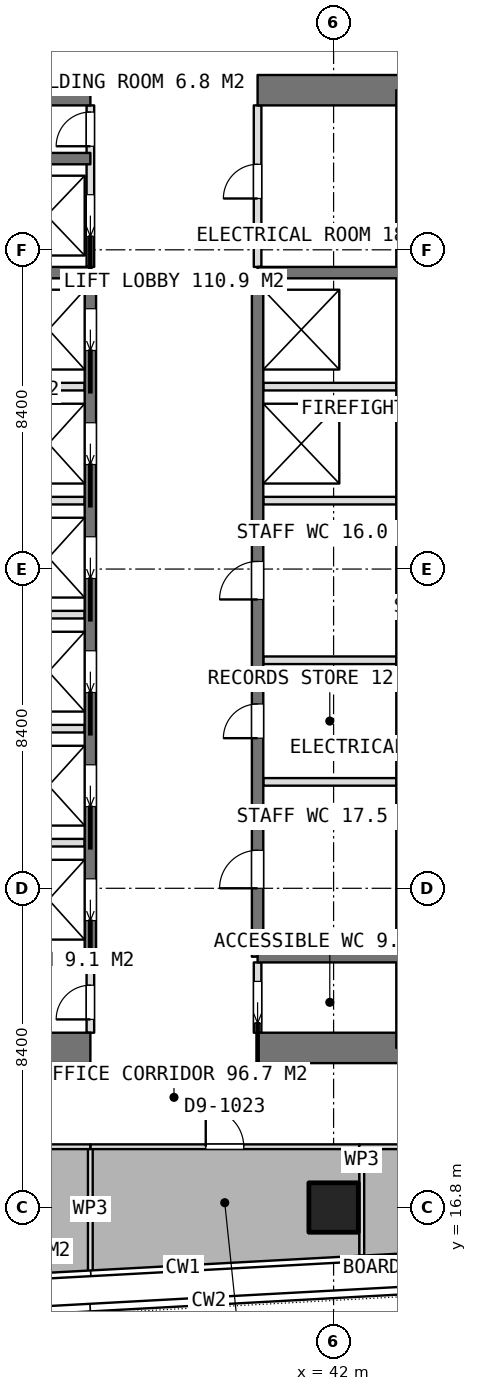
"""IFC4 building model, lengths in metres.
Left out: names, types, materials, properties, quantities, classifications, styles, units other than length and angle.
Written with IfcOpenShell. Run it as: python <this file> out.ifc"""

import sys

from ifc_helpers import new_model, si_unit, direction, frame, frame_2d, origin, origin_2d, place, context, subcontext, project, spatial, rectangle, extrude, element, fill, save


model = new_model("IFC4")
c1 = context("Model", 3, precision=1e-05, world=origin(), true_north=direction((0.0, 1.0)))
c2 = subcontext(c1, "Body", "Model", "MODEL_VIEW")
j1 = project(units=[si_unit("LENGTHUNIT", "METRE"), si_unit("PLANEANGLEUNIT", "RADIAN")], contexts=[c1])
p1 = place(None, origin())
s1 = spatial("IfcSite", under=j1, at=p1, CompositionType="ELEMENT")
p2 = place(p1, origin())
s2 = spatial("IfcBuilding", under=s1, at=p2, CompositionType="ELEMENT")
p3 = place(p2, frame((0.0, 0.0, 276.35)))
s3 = spatial("IfcBuildingStorey", under=s2, at=p3, CompositionType="ELEMENT", Elevation=276.35)
p4 = place(p3, frame((25.2, 21.0, 0.0), z_axis=(0.0, 0.0, 1.0), x_axis=(1.0, 0.0, 0.0)))
e1 = element("IfcWall", 1, at=p4, inside=s3, PredefinedType="SHEAR", context=c2, shape_type="SweptSolid", body=[
    extrude(rectangle(XDim=10.4, YDim=0.8, at=frame_2d((5.2, 0.0))), origin(), (0.0, 0.0, 1.0), 3.75),
])
p5 = place(p3, frame((40.0, 21.0, 0.0), z_axis=(0.0, 0.0, 1.0), x_axis=(1.0, 0.0, 0.0)))
e2 = element("IfcWall", 2, at=p5, inside=s3, PredefinedType="SHEAR", context=c2, shape_type="SweptSolid", body=[
    extrude(rectangle(XDim=10.4, YDim=0.8, at=frame_2d((5.2, 0.0))), origin(), (0.0, 0.0, 1.0), 3.75),
])
p6 = place(p3, frame((25.2, 46.2, 0.0), z_axis=(0.0, 0.0, 1.0), x_axis=(1.0, 0.0, 0.0)))
e3 = element("IfcWall", 3, at=p6, inside=s3, PredefinedType="SHEAR", context=c2, shape_type="SweptSolid", body=[
    extrude(rectangle(XDim=10.4, YDim=0.8, at=frame_2d((5.2, 0.0))), origin(), (0.0, 0.0, 1.0), 3.75),
])
p7 = place(p3, frame((40.0, 46.2, 0.0), z_axis=(0.0, 0.0, 1.0), x_axis=(1.0, 0.0, 0.0)))
e4 = element("IfcWall", 4, at=p7, inside=s3, PredefinedType="SHEAR", context=c2, shape_type="SweptSolid", body=[
    extrude(rectangle(XDim=10.4, YDim=0.8, at=frame_2d((5.2, 0.0))), origin(), (0.0, 0.0, 1.0), 3.75),
])
p8 = place(p3, frame((43.8, 21.0, 0.0), z_axis=(0.0, 0.0, 1.0), x_axis=(0.0, 1.0, 0.0)))
e5 = element("IfcWall", 5, at=p8, inside=s3, PredefinedType="SHEAR", context=c2, shape_type="SweptSolid", body=[
    extrude(rectangle(XDim=25.2, YDim=0.3, at=frame_2d((12.6, 0.0))), origin(), (0.0, 0.0, 1.0), 3.75),
])
p9 = place(p3, frame((35.6, 23.4, 0.0), z_axis=(0.0, 0.0, 1.0), x_axis=(0.0, 1.0, 0.0)))
e6 = element("IfcWall", 6, at=p9, inside=s3, PredefinedType="SHEAR", context=c2, shape_type="SweptSolid", body=[
    extrude(rectangle(XDim=18.0, YDim=0.3, at=frame_2d((9.0, 0.0))), origin(), (0.0, 0.0, 1.0), 3.75),
])
p10 = place(p9, frame((0.95, 0.0, 0.0)))
e7 = element("IfcOpeningElement", 7, at=p10, cuts=e6, PredefinedType="OPENING", context=c2, shape_type="SweptSolid", body=[
    extrude(rectangle(XDim=1.1, YDim=2.1, at=frame_2d((0.55, 1.05))), frame((0.0, 0.16, 0.0), z_axis=(0.0, -1.0, 0.0), x_axis=(1.0, 0.0, 0.0)), (0.0, 0.0, 1.0), 0.32),
])
p11 = place(p9, frame((3.95, 0.0, 0.0)))
e8 = element("IfcOpeningElement", 8, at=p11, cuts=e6, PredefinedType="OPENING", context=c2, shape_type="SweptSolid", body=[
    extrude(rectangle(XDim=1.1, YDim=2.1, at=frame_2d((0.55, 1.05))), frame((0.0, 0.16, 0.0), z_axis=(0.0, -1.0, 0.0), x_axis=(1.0, 0.0, 0.0)), (0.0, 0.0, 1.0), 0.32),
])
p12 = place(p9, frame((6.95, 0.0, 0.0)))
e9 = element("IfcOpeningElement", 9, at=p12, cuts=e6, PredefinedType="OPENING", context=c2, shape_type="SweptSolid", body=[
    extrude(rectangle(XDim=1.1, YDim=2.1, at=frame_2d((0.55, 1.05))), frame((0.0, 0.16, 0.0), z_axis=(0.0, -1.0, 0.0), x_axis=(1.0, 0.0, 0.0)), (0.0, 0.0, 1.0), 0.32),
])
p13 = place(p9, frame((9.95, 0.0, 0.0)))
e10 = element("IfcOpeningElement", 10, at=p13, cuts=e6, PredefinedType="OPENING", context=c2, shape_type="SweptSolid", body=[
    extrude(rectangle(XDim=1.1, YDim=2.1, at=frame_2d((0.55, 1.05))), frame((0.0, 0.16, 0.0), z_axis=(0.0, -1.0, 0.0), x_axis=(1.0, 0.0, 0.0)), (0.0, 0.0, 1.0), 0.32),
])
p14 = place(p9, frame((12.95, 0.0, 0.0)))
e11 = element("IfcOpeningElement", 11, at=p14, cuts=e6, PredefinedType="OPENING", context=c2, shape_type="SweptSolid", body=[
    extrude(rectangle(XDim=1.1, YDim=2.1, at=frame_2d((0.55, 1.05))), frame((0.0, 0.16, 0.0), z_axis=(0.0, -1.0, 0.0), x_axis=(1.0, 0.0, 0.0)), (0.0, 0.0, 1.0), 0.32),
])
p15 = place(p9, frame((15.95, 0.0, 0.0)))
e12 = element("IfcOpeningElement", 12, at=p15, cuts=e6, PredefinedType="OPENING", context=c2, shape_type="SweptSolid", body=[
    extrude(rectangle(XDim=1.1, YDim=2.1, at=frame_2d((0.55, 1.05))), frame((0.0, 0.16, 0.0), z_axis=(0.0, -1.0, 0.0), x_axis=(1.0, 0.0, 0.0)), (0.0, 0.0, 1.0), 0.32),
])
p16 = place(p3, frame((40.0, 23.4, 0.0), z_axis=(0.0, 0.0, 1.0), x_axis=(0.0, 1.0, 0.0)))
e13 = element("IfcWall", 13, at=p16, inside=s3, PredefinedType="SHEAR", context=c2, shape_type="SweptSolid", body=[
    extrude(rectangle(XDim=18.0, YDim=0.3, at=frame_2d((9.0, 0.0))), origin(), (0.0, 0.0, 1.0), 3.75),
])
p17 = place(p16, frame((1.8, 0.0, 0.0)))
e14 = element("IfcOpeningElement", 14, at=p17, cuts=e13, PredefinedType="OPENING", context=c2, shape_type="SweptSolid", body=[
    extrude(rectangle(XDim=1.0, YDim=2.1, at=frame_2d((0.5, 1.05))), frame((0.0, 0.16, 0.0), z_axis=(0.0, -1.0, 0.0), x_axis=(1.0, 0.0, 0.0)), (0.0, 0.0, 1.0), 0.32),
])
p18 = place(p16, frame((5.75, 0.0, 0.0)))
e15 = element("IfcOpeningElement", 15, at=p18, cuts=e13, PredefinedType="OPENING", context=c2, shape_type="SweptSolid", body=[
    extrude(rectangle(XDim=0.9, YDim=2.1, at=frame_2d((0.45, 1.05))), frame((0.0, 0.16, 0.0), z_axis=(0.0, -1.0, 0.0), x_axis=(1.0, 0.0, 0.0)), (0.0, 0.0, 1.0), 0.32),
])
p19 = place(p16, frame((9.4, 0.0, 0.0)))
e16 = element("IfcOpeningElement", 16, at=p19, cuts=e13, PredefinedType="OPENING", context=c2, shape_type="SweptSolid", body=[
    extrude(rectangle(XDim=1.0, YDim=2.1, at=frame_2d((0.5, 1.05))), frame((0.0, 0.16, 0.0), z_axis=(0.0, -1.0, 0.0), x_axis=(1.0, 0.0, 0.0)), (0.0, 0.0, 1.0), 0.32),
])
for number, where, z_axis, x_axis in (
    (17, (31.8, 23.4, 0.0), (0.0, 0.0, 1.0), (1.0, 0.0, 0.0)),
    (18, (31.8, 41.4, 0.0), (0.0, 0.0, 1.0), (1.0, 0.0, 0.0)),
    (19, (31.8, 44.4, 0.0), (0.0, 0.0, 1.0), (1.0, 0.0, 0.0)),
    (20, (40.0, 23.4, 0.0), (0.0, 0.0, 1.0), (1.0, 0.0, 0.0)),
    (21, (40.0, 41.4, 0.0), (0.0, 0.0, 1.0), (1.0, 0.0, 0.0)),
):
    element("IfcWall", number, at=place(p3, frame(where, z_axis=z_axis, x_axis=x_axis)), inside=s3, PredefinedType="SHEAR", context=c2, shape_type="SweptSolid", body=[
        extrude(rectangle(XDim=3.8, YDim=0.3, at=frame_2d((1.9, 0.0))), origin(), (0.0, 0.0, 1.0), 3.75),
    ])
p20 = place(p3, frame((42.0, 16.8, 0.0), z_axis=(0.0, 0.0, 1.0), x_axis=(1.0, 0.0, 0.0)))
e22 = element("IfcColumn", 22, at=p20, inside=s3, PredefinedType="COLUMN", context=c2, shape_type="SweptSolid", body=[
    extrude(rectangle(XDim=1.3, YDim=1.3, at=origin_2d()), origin(), (0.0, 0.0, 1.0), 3.75),
])
for number, where, z_axis, x_axis in (
    (23, (31.95, 26.4, 0.0), (0.0, 0.0, 1.0), (1.0, 0.0, 0.0)),
    (24, (31.95, 29.4, 0.0), (0.0, 0.0, 1.0), (1.0, 0.0, 0.0)),
    (25, (31.95, 32.4, 0.0), (0.0, 0.0, 1.0), (1.0, 0.0, 0.0)),
    (26, (31.95, 35.4, 0.0), (0.0, 0.0, 1.0), (1.0, 0.0, 0.0)),
    (27, (31.95, 38.4, 0.0), (0.0, 0.0, 1.0), (1.0, 0.0, 0.0)),
    (28, (40.15, 35.4, 0.0), (0.0, 0.0, 1.0), (1.0, 0.0, 0.0)),
    (29, (40.15, 38.4, 0.0), (0.0, 0.0, 1.0), (1.0, 0.0, 0.0)),
):
    element("IfcWall", number, at=place(p3, frame(where, z_axis=z_axis, x_axis=x_axis)), inside=s3, PredefinedType="PARTITIONING", context=c2, shape_type="SweptSolid", body=[
        extrude(rectangle(XDim=3.5, YDim=0.2, at=frame_2d((1.75, 0.0))), origin(), (0.0, 0.0, 1.0), 3.5),
    ])
p21 = place(p3, frame((40.0, 21.4, 0.0), z_axis=(0.0, 0.0, 1.0), x_axis=(0.0, 1.0, 0.0)))
e30 = element("IfcWall", 30, at=p21, inside=s3, PredefinedType="PARTITIONING", context=c2, shape_type="SweptSolid", body=[
    extrude(rectangle(XDim=1.85, YDim=0.2, at=frame_2d((0.925, 0.0))), origin(), (0.0, 0.0, 1.0), 3.5),
])
p22 = place(p21, frame((0.25, 0.0, 0.0)))
e31 = element("IfcOpeningElement", 31, at=p22, cuts=e30, PredefinedType="OPENING", context=c2, shape_type="SweptSolid", body=[
    extrude(rectangle(XDim=1.1, YDim=2.1, at=frame_2d((0.55, 1.05))), frame((0.0, 0.11, 0.0), z_axis=(0.0, -1.0, 0.0), x_axis=(1.0, 0.0, 0.0)), (0.0, 0.0, 1.0), 0.22),
])
p23 = place(p3, frame((40.0, 41.55, 0.0), z_axis=(0.0, 0.0, 1.0), x_axis=(0.0, 1.0, 0.0)))
e32 = element("IfcWall", 32, at=p23, inside=s3, PredefinedType="PARTITIONING", context=c2, shape_type="SweptSolid", body=[
    extrude(rectangle(XDim=4.25, YDim=0.2, at=frame_2d((2.125, 0.0))), origin(), (0.0, 0.0, 1.0), 3.5),
])
p24 = place(p23, frame((1.8, 0.0, 0.0)))
e33 = element("IfcOpeningElement", 33, at=p24, cuts=e32, PredefinedType="OPENING", context=c2, shape_type="SweptSolid", body=[
    extrude(rectangle(XDim=0.9, YDim=2.1, at=frame_2d((0.45, 1.05))), frame((0.0, 0.11, 0.0), z_axis=(0.0, -1.0, 0.0), x_axis=(1.0, 0.0, 0.0)), (0.0, 0.0, 1.0), 0.22),
])
p25 = place(p3, frame((35.6, 41.55, 0.0), z_axis=(0.0, 0.0, 1.0), x_axis=(0.0, 1.0, 0.0)))
e34 = element("IfcWall", 34, at=p25, inside=s3, PredefinedType="PARTITIONING", context=c2, shape_type="SweptSolid", body=[
    extrude(rectangle(XDim=4.25, YDim=0.2, at=frame_2d((2.125, 0.0))), origin(), (0.0, 0.0, 1.0), 3.5),
])
p26 = place(p25, frame((3.175, 0.0, 0.0)))
e35 = element("IfcOpeningElement", 35, at=p26, cuts=e34, PredefinedType="OPENING", context=c2, shape_type="SweptSolid", body=[
    extrude(rectangle(XDim=0.9, YDim=2.1, at=frame_2d((0.45, 1.05))), frame((0.0, 0.11, 0.0), z_axis=(0.0, -1.0, 0.0), x_axis=(1.0, 0.0, 0.0)), (0.0, 0.0, 1.0), 0.22),
])
p27 = place(p25, frame((0.8, 0.0, 0.0)))
e36 = element("IfcOpeningElement", 36, at=p27, cuts=e34, PredefinedType="OPENING", context=c2, shape_type="SweptSolid", body=[
    extrude(rectangle(XDim=1.1, YDim=2.1, at=frame_2d((0.55, 1.05))), frame((0.0, 0.11, 0.0), z_axis=(0.0, -1.0, 0.0), x_axis=(1.0, 0.0, 0.0)), (0.0, 0.0, 1.0), 0.22),
])
p28 = place(p3, frame((35.6, 21.4, 0.0), z_axis=(0.0, 0.0, 1.0), x_axis=(0.0, 1.0, 0.0)))
e37 = element("IfcWall", 37, at=p28, inside=s3, PredefinedType="PARTITIONING", context=c2, shape_type="SweptSolid", body=[
    extrude(rectangle(XDim=1.85, YDim=0.2, at=frame_2d((0.925, 0.0))), origin(), (0.0, 0.0, 1.0), 3.5),
])
p29 = place(p28, frame((0.35, 0.0, 0.0)))
e38 = element("IfcOpeningElement", 38, at=p29, cuts=e37, PredefinedType="OPENING", context=c2, shape_type="SweptSolid", body=[
    extrude(rectangle(XDim=0.9, YDim=2.1, at=frame_2d((0.45, 1.05))), frame((0.0, 0.11, 0.0), z_axis=(0.0, -1.0, 0.0), x_axis=(1.0, 0.0, 0.0)), (0.0, 0.0, 1.0), 0.22),
])
for number, where, z_axis, x_axis in (
    (39, (40.15, 28.0, 0.0), (0.0, 0.0, 1.0), (1.0, 0.0, 0.0)),
    (40, (40.15, 31.2, 0.0), (0.0, 0.0, 1.0), (1.0, 0.0, 0.0)),
):
    element("IfcWall", number, at=place(p3, frame(where, z_axis=z_axis, x_axis=x_axis)), inside=s3, PredefinedType="PARTITIONING", context=c2, shape_type="SweptSolid", body=[
        extrude(rectangle(XDim=3.5, YDim=0.2, at=frame_2d((1.75, 0.0))), origin(), (0.0, 0.0, 1.0), 3.5),
    ])
p30 = place(p3, frame((35.599, 15.119, 0.0), z_axis=(0.0, 0.0, 1.0), x_axis=(0.0, 1.0, 0.0)))
e41 = element("IfcWall", 41, at=p30, inside=s3, PredefinedType="PARTITIONING", context=c2, shape_type="SweptSolid", body=[
    extrude(rectangle(XDim=3.281, YDim=0.125, at=frame_2d((1.641, 0.0))), origin(), (0.0, 0.0, 1.0), 3.5),
])
p31 = place(p3, frame((35.599, 18.4, 0.0), z_axis=(0.0, 0.0, 1.0), x_axis=(1.0, 0.0, 0.0)))
e42 = element("IfcWall", 42, at=p31, inside=s3, PredefinedType="PARTITIONING", context=c2, shape_type="SweptSolid", body=[
    extrude(rectangle(XDim=7.074, YDim=0.125, at=frame_2d((3.537, 0.0))), origin(), (0.0, 0.0, 1.0), 3.5),
])
p32 = place(p31, frame((3.037, 0.0, 0.0)))
e43 = element("IfcOpeningElement", 43, at=p32, cuts=e42, PredefinedType="OPENING", context=c2, shape_type="SweptSolid", body=[
    extrude(rectangle(XDim=1.0, YDim=2.1, at=frame_2d((0.5, 1.05))), frame((0.0, 0.073, 0.0), z_axis=(0.0, -1.0, 0.0), x_axis=(1.0, 0.0, 0.0)), (0.0, 0.0, 1.0), 0.145),
])
p33 = place(p3, frame((42.742, 18.337, 0.0), z_axis=(0.0, 0.0, 1.0), x_axis=(0.0, -1.0, 0.0)))
e44 = element("IfcWall", 44, at=p33, inside=s3, PredefinedType="PARTITIONING", context=c2, shape_type="SweptSolid", body=[
    extrude(rectangle(XDim=2.799, YDim=0.125, at=frame_2d((1.399, 0.0))), origin(), (0.0, 0.0, 1.0), 3.5),
])
p34 = place(p3, frame((42.674, 18.4, 0.0), z_axis=(0.0, 0.0, 1.0), x_axis=(1.0, 0.0, 0.0)))
e45 = element("IfcWall", 45, at=p34, inside=s3, PredefinedType="PARTITIONING", context=c2, shape_type="SweptSolid", body=[
    extrude(rectangle(XDim=7.726, YDim=0.125, at=frame_2d((3.863, 0.0))), origin(), (0.0, 0.0, 1.0), 3.5),
])
p35 = place(p34, frame((3.363, 0.0, 0.0)))
e46 = element("IfcOpeningElement", 46, at=p35, cuts=e45, PredefinedType="OPENING", context=c2, shape_type="SweptSolid", body=[
    extrude(rectangle(XDim=1.0, YDim=2.1, at=frame_2d((0.5, 1.05))), frame((0.0, 0.073, 0.0), z_axis=(0.0, -1.0, 0.0), x_axis=(1.0, 0.0, 0.0)), (0.0, 0.0, 1.0), 0.145),
])
p36 = place(p3, frame((25.207, 18.4, 0.0), z_axis=(0.0, 0.0, 1.0), x_axis=(1.0, 0.0, 0.0)))
e47 = element("IfcWall", 47, at=p36, inside=s3, PredefinedType="PARTITIONING", context=c2, shape_type="SweptSolid", body=[
    extrude(rectangle(XDim=10.391, YDim=0.125, at=frame_2d((5.195, 0.0))), origin(), (0.0, 0.0, 1.0), 3.5),
])
p37 = place(p36, frame((4.695, 0.0, 0.0)))
e48 = element("IfcOpeningElement", 48, at=p37, cuts=e47, PredefinedType="OPENING", context=c2, shape_type="SweptSolid", body=[
    extrude(rectangle(XDim=1.0, YDim=2.1, at=frame_2d((0.5, 1.05))), frame((0.0, 0.073, 0.0), z_axis=(0.0, -1.0, 0.0), x_axis=(1.0, 0.0, 0.0)), (0.0, 0.0, 1.0), 0.145),
])
p38 = place(p22, origin())
e49 = element("IfcDoor", 49, at=p38, inside=s3, OperationType="SLIDING_TO_LEFT", PredefinedType="DOOR", context=c2, shape_type="SweptSolid", body=[
    extrude(rectangle(XDim=1.1, YDim=2.1, at=frame_2d((0.55, 1.05))), frame((0.0, 0.025, 0.0), z_axis=(0.0, -1.0, 0.0), x_axis=(1.0, 0.0, 0.0)), (0.0, 0.0, 1.0), 0.05),
])
fill(e31, e49)
p39 = place(p29, origin())
e50 = element("IfcDoor", 50, at=p39, inside=s3, OperationType="SINGLE_SWING_LEFT", PredefinedType="DOOR", context=c2, shape_type="SweptSolid", body=[
    extrude(rectangle(XDim=0.9, YDim=2.1, at=frame_2d((0.45, 1.05))), frame((0.0, 0.025, 0.0), z_axis=(0.0, -1.0, 0.0), x_axis=(1.0, 0.0, 0.0)), (0.0, 0.0, 1.0), 0.05),
])
fill(e38, e50)
p40 = place(p24, origin())
e51 = element("IfcDoor", 51, at=p40, inside=s3, OperationType="SINGLE_SWING_LEFT", PredefinedType="DOOR", context=c2, shape_type="SweptSolid", body=[
    extrude(rectangle(XDim=0.9, YDim=2.1, at=frame_2d((0.45, 1.05))), frame((0.0, 0.025, 0.0), z_axis=(0.0, -1.0, 0.0), x_axis=(1.0, 0.0, 0.0)), (0.0, 0.0, 1.0), 0.05),
])
fill(e33, e51)
p41 = place(p17, origin())
e52 = element("IfcDoor", 52, at=p41, inside=s3, OperationType="SINGLE_SWING_LEFT", PredefinedType="DOOR", context=c2, shape_type="SweptSolid", body=[
    extrude(rectangle(XDim=1.0, YDim=2.1, at=frame_2d((0.5, 1.05))), frame((0.0, 0.025, 0.0), z_axis=(0.0, -1.0, 0.0), x_axis=(1.0, 0.0, 0.0)), (0.0, 0.0, 1.0), 0.05),
])
fill(e14, e52)
p42 = place(p18, origin())
e53 = element("IfcDoor", 53, at=p42, inside=s3, OperationType="SINGLE_SWING_LEFT", PredefinedType="DOOR", context=c2, shape_type="SweptSolid", body=[
    extrude(rectangle(XDim=0.9, YDim=2.1, at=frame_2d((0.45, 1.05))), frame((0.0, 0.025, 0.0), z_axis=(0.0, -1.0, 0.0), x_axis=(1.0, 0.0, 0.0)), (0.0, 0.0, 1.0), 0.05),
])
fill(e15, e53)
p43 = place(p19, origin())
e54 = element("IfcDoor", 54, at=p43, inside=s3, OperationType="SINGLE_SWING_LEFT", PredefinedType="DOOR", context=c2, shape_type="SweptSolid", body=[
    extrude(rectangle(XDim=1.0, YDim=2.1, at=frame_2d((0.5, 1.05))), frame((0.0, 0.025, 0.0), z_axis=(0.0, -1.0, 0.0), x_axis=(1.0, 0.0, 0.0)), (0.0, 0.0, 1.0), 0.05),
])
fill(e16, e54)
p44 = place(p26, origin())
e55 = element("IfcDoor", 55, at=p44, inside=s3, OperationType="SINGLE_SWING_LEFT", PredefinedType="DOOR", context=c2, shape_type="SweptSolid", body=[
    extrude(rectangle(XDim=0.9, YDim=2.1, at=frame_2d((0.45, 1.05))), frame((0.0, 0.025, 0.0), z_axis=(0.0, -1.0, 0.0), x_axis=(1.0, 0.0, 0.0)), (0.0, 0.0, 1.0), 0.05),
])
fill(e35, e55)
p45 = place(p10, origin())
e56 = element("IfcDoor", 56, at=p45, inside=s3, OperationType="SLIDING_TO_LEFT", PredefinedType="USERDEFINED", context=c2, shape_type="SweptSolid", body=[
    extrude(rectangle(XDim=1.1, YDim=2.1, at=frame_2d((0.55, 1.05))), frame((0.0, 0.025, 0.0), z_axis=(0.0, -1.0, 0.0), x_axis=(1.0, 0.0, 0.0)), (0.0, 0.0, 1.0), 0.05),
])
fill(e7, e56)
p46 = place(p11, origin())
e57 = element("IfcDoor", 57, at=p46, inside=s3, OperationType="SLIDING_TO_LEFT", PredefinedType="USERDEFINED", context=c2, shape_type="SweptSolid", body=[
    extrude(rectangle(XDim=1.1, YDim=2.1, at=frame_2d((0.55, 1.05))), frame((0.0, 0.025, 0.0), z_axis=(0.0, -1.0, 0.0), x_axis=(1.0, 0.0, 0.0)), (0.0, 0.0, 1.0), 0.05),
])
fill(e8, e57)
p47 = place(p12, origin())
e58 = element("IfcDoor", 58, at=p47, inside=s3, OperationType="SLIDING_TO_LEFT", PredefinedType="USERDEFINED", context=c2, shape_type="SweptSolid", body=[
    extrude(rectangle(XDim=1.1, YDim=2.1, at=frame_2d((0.55, 1.05))), frame((0.0, 0.025, 0.0), z_axis=(0.0, -1.0, 0.0), x_axis=(1.0, 0.0, 0.0)), (0.0, 0.0, 1.0), 0.05),
])
fill(e9, e58)
p48 = place(p13, origin())
e59 = element("IfcDoor", 59, at=p48, inside=s3, OperationType="SLIDING_TO_LEFT", PredefinedType="USERDEFINED", context=c2, shape_type="SweptSolid", body=[
    extrude(rectangle(XDim=1.1, YDim=2.1, at=frame_2d((0.55, 1.05))), frame((0.0, 0.025, 0.0), z_axis=(0.0, -1.0, 0.0), x_axis=(1.0, 0.0, 0.0)), (0.0, 0.0, 1.0), 0.05),
])
fill(e10, e59)
p49 = place(p14, origin())
e60 = element("IfcDoor", 60, at=p49, inside=s3, OperationType="SLIDING_TO_LEFT", PredefinedType="USERDEFINED", context=c2, shape_type="SweptSolid", body=[
    extrude(rectangle(XDim=1.1, YDim=2.1, at=frame_2d((0.55, 1.05))), frame((0.0, 0.025, 0.0), z_axis=(0.0, -1.0, 0.0), x_axis=(1.0, 0.0, 0.0)), (0.0, 0.0, 1.0), 0.05),
])
fill(e11, e60)
p50 = place(p15, origin())
e61 = element("IfcDoor", 61, at=p50, inside=s3, OperationType="SLIDING_TO_LEFT", PredefinedType="USERDEFINED", context=c2, shape_type="SweptSolid", body=[
    extrude(rectangle(XDim=1.1, YDim=2.1, at=frame_2d((0.55, 1.05))), frame((0.0, 0.025, 0.0), z_axis=(0.0, -1.0, 0.0), x_axis=(1.0, 0.0, 0.0)), (0.0, 0.0, 1.0), 0.05),
])
fill(e12, e61)
p51 = place(p27, origin())
e62 = element("IfcDoor", 62, at=p51, inside=s3, OperationType="SLIDING_TO_LEFT", PredefinedType="USERDEFINED", context=c2, shape_type="SweptSolid", body=[
    extrude(rectangle(XDim=1.1, YDim=2.1, at=frame_2d((0.55, 1.05))), frame((0.0, 0.025, 0.0), z_axis=(0.0, -1.0, 0.0), x_axis=(1.0, 0.0, 0.0)), (0.0, 0.0, 1.0), 0.05),
])
fill(e36, e62)
p52 = place(p32, origin())
e63 = element("IfcDoor", 63, at=p52, inside=s3, OperationType="SINGLE_SWING_LEFT", PredefinedType="DOOR", context=c2, shape_type="SweptSolid", body=[
    extrude(rectangle(XDim=1.0, YDim=2.1, at=frame_2d((0.5, 1.05))), frame((0.0, 0.025, 0.0), z_axis=(0.0, -1.0, 0.0), x_axis=(1.0, 0.0, 0.0)), (0.0, 0.0, 1.0), 0.05),
])
fill(e43, e63)
save(model, sys.argv[1])
